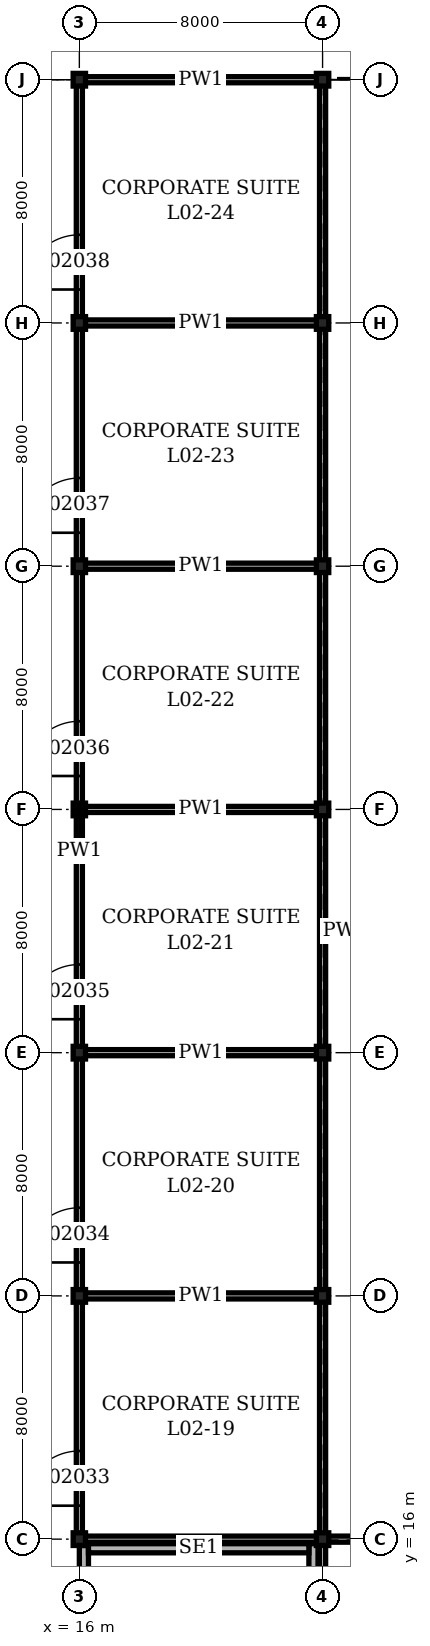
"""IFC4 building model, lengths in metres.
Left out: names, types, materials, properties, quantities, classifications, styles, units other than length and angle.
Written with IfcOpenShell. Run it as: python <this file> out.ifc"""

import sys

from ifc_helpers import new_model, si_unit, direction, frame, frame_2d, origin, origin_2d, place, context, subcontext, project, spatial, rectangle, i_section, extrude, element, fill, save


model = new_model("IFC4")
c1 = context("Model", 3, precision=1e-05, world=origin(), true_north=direction((0.0, 1.0)))
c2 = subcontext(c1, "Body", "Model", "MODEL_VIEW")
j1 = project(units=[si_unit("LENGTHUNIT", "METRE"), si_unit("PLANEANGLEUNIT", "RADIAN")], contexts=[c1])
p1 = place(None, origin())
s1 = spatial("IfcSite", under=j1, at=p1, CompositionType="ELEMENT")
p2 = place(p1, origin())
s2 = spatial("IfcBuilding", under=s1, at=p2, CompositionType="ELEMENT")
p3 = place(p2, frame((0.0, 0.0, 9.9)))
s3 = spatial("IfcBuildingStorey", under=s2, at=p3, CompositionType="ELEMENT", Elevation=9.9)
for number, where, z_axis, x_axis in (
    (1, (16.0, 16.0, 0.0), (0.0, 0.0, 1.0), (1.0, 0.0, 0.0)),
    (2, (16.0, 24.0, 0.0), (0.0, 0.0, 1.0), (1.0, 0.0, 0.0)),
    (3, (16.0, 32.0, 0.0), (0.0, 0.0, 1.0), (1.0, 0.0, 0.0)),
    (4, (16.0, 40.0, 0.0), (0.0, 0.0, 1.0), (1.0, 0.0, 0.0)),
    (5, (16.0, 48.0, 0.0), (0.0, 0.0, 1.0), (1.0, 0.0, 0.0)),
    (6, (16.0, 56.0, 0.0), (0.0, 0.0, 1.0), (1.0, 0.0, 0.0)),
    (7, (16.0, 64.0, 0.0), (0.0, 0.0, 1.0), (1.0, 0.0, 0.0)),
    (8, (24.0, 16.0, 0.0), (0.0, 0.0, 1.0), (1.0, 0.0, 0.0)),
    (9, (24.0, 24.0, 0.0), (0.0, 0.0, 1.0), (1.0, 0.0, 0.0)),
    (10, (24.0, 32.0, 0.0), (0.0, 0.0, 1.0), (1.0, 0.0, 0.0)),
    (11, (24.0, 40.0, 0.0), (0.0, 0.0, 1.0), (1.0, 0.0, 0.0)),
    (12, (24.0, 48.0, 0.0), (0.0, 0.0, 1.0), (1.0, 0.0, 0.0)),
    (13, (24.0, 56.0, 0.0), (0.0, 0.0, 1.0), (1.0, 0.0, 0.0)),
    (14, (24.0, 64.0, 0.0), (0.0, 0.0, 1.0), (1.0, 0.0, 0.0)),
):
    element("IfcColumn", number, at=place(p3, frame(where, z_axis=z_axis, x_axis=x_axis)), inside=s3, PredefinedType="COLUMN", context=c2, shape_type="SweptSolid", body=[
        extrude(i_section(OverallWidth=0.406, OverallDepth=0.417, WebThickness=0.03, FlangeThickness=0.048, at=origin_2d()), origin(), (0.0, 0.0, 1.0), 5.0),
    ])
p4 = place(p3, frame((16.15, 5.0, 0.0), z_axis=(0.0, 0.0, 1.0), x_axis=(0.0, 1.0, 0.0)))
e15 = element("IfcWall", 15, at=p4, inside=s3, PredefinedType="SOLIDWALL", context=c2, shape_type="SweptSolid", body=[
    extrude(rectangle(XDim=10.792, YDim=0.3, at=frame_2d((5.396, 0.0))), origin(), (0.0, 0.0, 1.0), 4.8),
])
p5 = place(p3, frame((23.7, 5.0, 0.0), z_axis=(0.0, 0.0, 1.0), x_axis=(0.0, 1.0, 0.0)))
e16 = element("IfcWall", 16, at=p5, inside=s3, PredefinedType="SOLIDWALL", context=c2, shape_type="SweptSolid", body=[
    extrude(rectangle(XDim=10.85, YDim=0.3, at=frame_2d((5.425, 0.0))), origin(), (0.0, 0.0, 1.0), 4.8),
])
p6 = place(p3, frame((16.3, 15.7, 0.0), z_axis=(0.0, 0.0, 1.0), x_axis=(1.0, 0.0, 0.0)))
e17 = element("IfcWall", 17, at=p6, inside=s3, PredefinedType="SOLIDWALL", context=c2, shape_type="SweptSolid", body=[
    extrude(rectangle(XDim=7.25, YDim=0.3, at=frame_2d((3.625, 0.0))), origin(), (0.0, 0.0, 1.0), 4.8),
])
p7 = place(p3, frame((16.1, 16.0, 0.0), z_axis=(0.0, 0.0, 1.0), x_axis=(1.0, 0.0, 0.0)))
e18 = element("IfcWall", 18, at=p7, inside=s3, PredefinedType="PARTITIONING", context=c2, shape_type="SweptSolid", body=[
    extrude(rectangle(XDim=79.8, YDim=0.2, at=frame_2d((39.9, 0.0))), origin(), (0.0, 0.0, 1.0), 4.028),
])
for number, where, z_axis, x_axis in (
    (19, (16.1, 24.0, 0.0), (0.0, 0.0, 1.0), (1.0, 0.0, 0.0)),
    (20, (16.1, 32.0, 0.0), (0.0, 0.0, 1.0), (1.0, 0.0, 0.0)),
    (21, (16.1, 40.0, 0.0), (0.0, 0.0, 1.0), (1.0, 0.0, 0.0)),
    (22, (16.1, 48.0, 0.0), (0.0, 0.0, 1.0), (1.0, 0.0, 0.0)),
    (23, (16.1, 56.0, 0.0), (0.0, 0.0, 1.0), (1.0, 0.0, 0.0)),
):
    element("IfcWall", number, at=place(p3, frame(where, z_axis=z_axis, x_axis=x_axis)), inside=s3, PredefinedType="PARTITIONING", context=c2, shape_type="SweptSolid", body=[
        extrude(rectangle(XDim=7.8, YDim=0.2, at=frame_2d((3.9, 0.0))), origin(), (0.0, 0.0, 1.0), 4.072),
    ])
p8 = place(p3, frame((16.1, 64.0, 0.0), z_axis=(0.0, 0.0, 1.0), x_axis=(1.0, 0.0, 0.0)))
e24 = element("IfcWall", 24, at=p8, inside=s3, PredefinedType="PARTITIONING", context=c2, shape_type="SweptSolid", body=[
    extrude(rectangle(XDim=7.8, YDim=0.2, at=frame_2d((3.9, 0.0))), origin(), (0.0, 0.0, 1.0), 4.028),
])
p9 = place(p3, frame((16.0, 16.1, 0.0), z_axis=(0.0, 0.0, 1.0), x_axis=(0.0, 1.0, 0.0)))
e25 = element("IfcWall", 25, at=p9, inside=s3, PredefinedType="PARTITIONING", context=c2, shape_type="SweptSolid", body=[
    extrude(rectangle(XDim=47.8, YDim=0.2, at=frame_2d((23.9, 0.0))), origin(), (0.0, 0.0, 1.0), 4.028),
])
p10 = place(p9, frame((1.0, 0.0, 0.0)))
e26 = element("IfcOpeningElement", 26, at=p10, cuts=e25, PredefinedType="OPENING", context=c2, shape_type="SweptSolid", body=[
    extrude(rectangle(XDim=1.8, YDim=2.4, at=frame_2d((0.9, 1.2))), frame((0.0, 0.11, 0.0), z_axis=(0.0, -1.0, 0.0), x_axis=(1.0, 0.0, 0.0)), (0.0, 0.0, 1.0), 0.22),
])
p11 = place(p9, frame((9.0, 0.0, 0.0)))
e27 = element("IfcOpeningElement", 27, at=p11, cuts=e25, PredefinedType="OPENING", context=c2, shape_type="SweptSolid", body=[
    extrude(rectangle(XDim=1.8, YDim=2.4, at=frame_2d((0.9, 1.2))), frame((0.0, 0.11, 0.0), z_axis=(0.0, -1.0, 0.0), x_axis=(1.0, 0.0, 0.0)), (0.0, 0.0, 1.0), 0.22),
])
p12 = place(p9, frame((17.0, 0.0, 0.0)))
e28 = element("IfcOpeningElement", 28, at=p12, cuts=e25, PredefinedType="OPENING", context=c2, shape_type="SweptSolid", body=[
    extrude(rectangle(XDim=1.8, YDim=2.4, at=frame_2d((0.9, 1.2))), frame((0.0, 0.11, 0.0), z_axis=(0.0, -1.0, 0.0), x_axis=(1.0, 0.0, 0.0)), (0.0, 0.0, 1.0), 0.22),
])
p13 = place(p9, frame((25.0, 0.0, 0.0)))
e29 = element("IfcOpeningElement", 29, at=p13, cuts=e25, PredefinedType="OPENING", context=c2, shape_type="SweptSolid", body=[
    extrude(rectangle(XDim=1.8, YDim=2.4, at=frame_2d((0.9, 1.2))), frame((0.0, 0.11, 0.0), z_axis=(0.0, -1.0, 0.0), x_axis=(1.0, 0.0, 0.0)), (0.0, 0.0, 1.0), 0.22),
])
p14 = place(p9, frame((33.0, 0.0, 0.0)))
e30 = element("IfcOpeningElement", 30, at=p14, cuts=e25, PredefinedType="OPENING", context=c2, shape_type="SweptSolid", body=[
    extrude(rectangle(XDim=1.8, YDim=2.4, at=frame_2d((0.9, 1.2))), frame((0.0, 0.11, 0.0), z_axis=(0.0, -1.0, 0.0), x_axis=(1.0, 0.0, 0.0)), (0.0, 0.0, 1.0), 0.22),
])
p15 = place(p9, frame((41.0, 0.0, 0.0)))
e31 = element("IfcOpeningElement", 31, at=p15, cuts=e25, PredefinedType="OPENING", context=c2, shape_type="SweptSolid", body=[
    extrude(rectangle(XDim=1.8, YDim=2.4, at=frame_2d((0.9, 1.2))), frame((0.0, 0.11, 0.0), z_axis=(0.0, -1.0, 0.0), x_axis=(1.0, 0.0, 0.0)), (0.0, 0.0, 1.0), 0.22),
])
p16 = place(p3, frame((24.0, 8.1, 0.0), z_axis=(0.0, 0.0, 1.0), x_axis=(0.0, 1.0, 0.0)))
e32 = element("IfcWall", 32, at=p16, inside=s3, PredefinedType="PARTITIONING", context=c2, shape_type="SweptSolid", body=[
    extrude(rectangle(XDim=55.8, YDim=0.2, at=frame_2d((27.9, 0.0))), origin(), (0.0, 0.0, 1.0), 4.028),
])
p17 = place(p10, origin())
e33 = element("IfcDoor", 33, at=p17, inside=s3, OperationType="DOUBLE_DOOR_DOUBLE_SWING", PredefinedType="DOOR", context=c2, shape_type="SweptSolid", body=[
    extrude(rectangle(XDim=1.8, YDim=2.4, at=frame_2d((0.9, 1.2))), frame((0.0, 0.1, 0.0), z_axis=(0.0, -1.0, 0.0), x_axis=(1.0, 0.0, 0.0)), (0.0, 0.0, 1.0), 0.199),
])
fill(e26, e33)
p18 = place(p11, origin())
e34 = element("IfcDoor", 34, at=p18, inside=s3, OperationType="DOUBLE_DOOR_DOUBLE_SWING", PredefinedType="DOOR", context=c2, shape_type="SweptSolid", body=[
    extrude(rectangle(XDim=1.8, YDim=2.4, at=frame_2d((0.9, 1.2))), frame((0.0, 0.1, 0.0), z_axis=(0.0, -1.0, 0.0), x_axis=(1.0, 0.0, 0.0)), (0.0, 0.0, 1.0), 0.199),
])
fill(e27, e34)
p19 = place(p12, origin())
e35 = element("IfcDoor", 35, at=p19, inside=s3, OperationType="DOUBLE_DOOR_DOUBLE_SWING", PredefinedType="DOOR", context=c2, shape_type="SweptSolid", body=[
    extrude(rectangle(XDim=1.8, YDim=2.4, at=frame_2d((0.9, 1.2))), frame((0.0, 0.1, 0.0), z_axis=(0.0, -1.0, 0.0), x_axis=(1.0, 0.0, 0.0)), (0.0, 0.0, 1.0), 0.199),
])
fill(e28, e35)
p20 = place(p13, origin())
e36 = element("IfcDoor", 36, at=p20, inside=s3, OperationType="DOUBLE_DOOR_DOUBLE_SWING", PredefinedType="DOOR", context=c2, shape_type="SweptSolid", body=[
    extrude(rectangle(XDim=1.8, YDim=2.4, at=frame_2d((0.9, 1.2))), frame((0.0, 0.1, 0.0), z_axis=(0.0, -1.0, 0.0), x_axis=(1.0, 0.0, 0.0)), (0.0, 0.0, 1.0), 0.199),
])
fill(e29, e36)
p21 = place(p14, origin())
e37 = element("IfcDoor", 37, at=p21, inside=s3, OperationType="DOUBLE_DOOR_DOUBLE_SWING", PredefinedType="DOOR", context=c2, shape_type="SweptSolid", body=[
    extrude(rectangle(XDim=1.8, YDim=2.4, at=frame_2d((0.9, 1.2))), frame((0.0, 0.1, 0.0), z_axis=(0.0, -1.0, 0.0), x_axis=(1.0, 0.0, 0.0)), (0.0, 0.0, 1.0), 0.199),
])
fill(e30, e37)
p22 = place(p15, origin())
e38 = element("IfcDoor", 38, at=p22, inside=s3, OperationType="DOUBLE_DOOR_DOUBLE_SWING", PredefinedType="DOOR", context=c2, shape_type="SweptSolid", body=[
    extrude(rectangle(XDim=1.8, YDim=2.4, at=frame_2d((0.9, 1.2))), frame((0.0, 0.1, 0.0), z_axis=(0.0, -1.0, 0.0), x_axis=(1.0, 0.0, 0.0)), (0.0, 0.0, 1.0), 0.199),
])
fill(e31, e38)
save(model, sys.argv[1])
